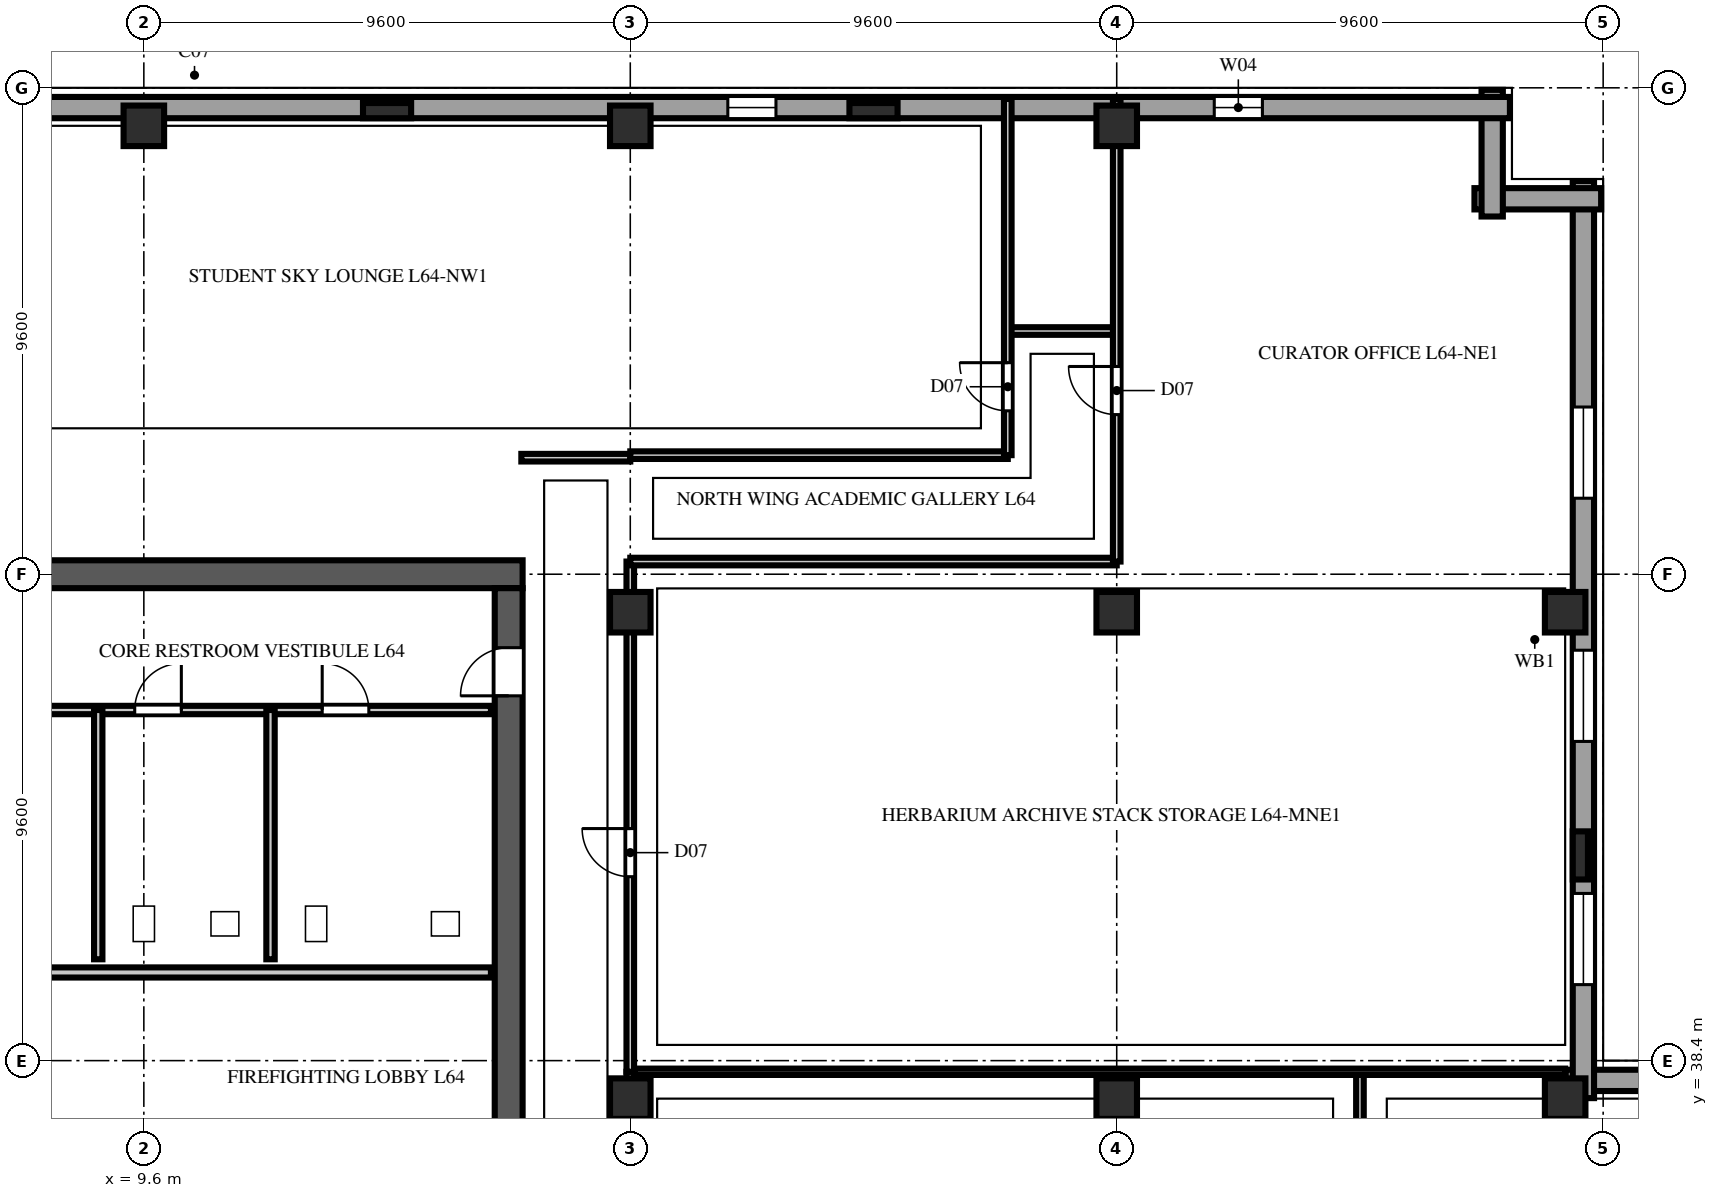
"""IFC4 building model, lengths in metres.
Left out: names, types, materials, properties, quantities, classifications, styles, units other than length and angle.
Written with IfcOpenShell. Run it as: python <this file> out.ifc"""

import sys

from ifc_helpers import new_model, si_unit, direction, frame, frame_2d, origin, origin_2d, place, context, subcontext, project, spatial, rectangle, extrude, element, fill, save


model = new_model("IFC4")
c1 = context("Model", 3, precision=1e-05, world=origin(), true_north=direction((0.0, 1.0)))
c2 = subcontext(c1, "Body", "Model", "MODEL_VIEW")
j1 = project(units=[si_unit("LENGTHUNIT", "METRE"), si_unit("PLANEANGLEUNIT", "RADIAN")], contexts=[c1])
p1 = place(None, origin())
s1 = spatial("IfcSite", under=j1, at=p1, CompositionType="ELEMENT")
p2 = place(p1, origin())
s2 = spatial("IfcBuilding", under=s1, at=p2, CompositionType="ELEMENT")
p3 = place(p2, frame((0.0, 0.0, 252.2)))
s3 = spatial("IfcBuildingStorey", under=s2, at=p3, CompositionType="ELEMENT", Elevation=252.2)
p4 = place(p3, frame((2.475, 48.0, 0.0), z_axis=(0.0, 0.0, 1.0), x_axis=(1.0, 0.0, 0.0)))
e1 = element("IfcWall", 1, at=p4, inside=s3, PredefinedType="SHEAR", context=c2, shape_type="SweptSolid", body=[
    extrude(rectangle(XDim=14.6, YDim=0.55, at=frame_2d((7.3, 0.0))), origin(), (0.0, 0.0, 1.0), 3.48),
])
p5 = place(p3, frame((16.8, 36.4, 0.0), z_axis=(0.0, 0.0, 1.0), x_axis=(0.0, 1.0, 0.0)))
e2 = element("IfcWall", 2, at=p5, inside=s3, PredefinedType="SHEAR", context=c2, shape_type="SweptSolid", body=[
    extrude(rectangle(XDim=11.325, YDim=0.55, at=frame_2d((5.663, 0.0))), origin(), (0.0, 0.0, 1.0), 3.48),
])
p6 = place(p5, frame((9.2, 0.0, 0.0)))
e3 = element("IfcOpeningElement", 3, at=p6, cuts=e2, PredefinedType="OPENING", context=c2, shape_type="SweptSolid", body=[
    extrude(rectangle(XDim=0.95, YDim=2.15, at=frame_2d((0.475, 1.075))), frame((0.0, 0.287, 0.0), z_axis=(0.0, -1.0, 0.0), x_axis=(1.0, 0.0, 0.0)), (0.0, 0.0, 1.0), 0.574),
])
for number, where, z_axis, x_axis in (
    (4, (9.6, 56.85, 0.0), (0.0, 0.0, 1.0), (1.0, 0.0, 0.0)),
    (5, (19.2, 37.65, 0.0), (0.0, 0.0, 1.0), (1.0, 0.0, 0.0)),
    (6, (19.2, 47.25, 0.0), (0.0, 0.0, 1.0), (1.0, 0.0, 0.0)),
    (7, (19.2, 56.85, 0.0), (0.0, 0.0, 1.0), (1.0, 0.0, 0.0)),
    (8, (28.8, 37.65, 0.0), (0.0, 0.0, 1.0), (1.0, 0.0, 0.0)),
    (9, (28.8, 47.25, 0.0), (0.0, 0.0, 1.0), (1.0, 0.0, 0.0)),
    (10, (28.8, 56.85, 0.0), (0.0, 0.0, 1.0), (1.0, 0.0, 0.0)),
    (11, (37.65, 37.65, 0.0), (0.0, 0.0, 1.0), (1.0, 0.0, 0.0)),
    (12, (37.65, 47.25, 0.0), (0.0, 0.0, 1.0), (1.0, 0.0, 0.0)),
):
    element("IfcColumn", number, at=place(p3, frame(where, z_axis=z_axis, x_axis=x_axis)), inside=s3, PredefinedType="COLUMN", context=c2, shape_type="SweptSolid", body=[
        extrude(rectangle(XDim=0.8, YDim=0.8, at=origin_2d()), origin(), (0.0, 0.0, 1.0), 3.8),
    ])
for number, where, z_axis, x_axis in (
    (13, (14.4, 57.15, 0.0), (0.0, 0.0, 1.0), (1.0, 0.0, 0.0)),
    (14, (24.0, 57.15, 0.0), (0.0, 0.0, 1.0), (1.0, 0.0, 0.0)),
    (15, (37.95, 42.45, 0.0), (0.0, 0.0, 1.0), (0.0, 1.0, 0.0)),
):
    element("IfcColumn", number, at=place(p3, frame(where, z_axis=z_axis, x_axis=x_axis)), inside=s3, PredefinedType="PILASTER", context=c2, shape_type="SweptSolid", body=[
        extrude(rectangle(XDim=0.95, YDim=0.3, at=origin_2d()), origin(), (0.0, 0.0, 1.0), 3.8),
    ])
p7 = place(p3, frame((55.76, 38.01, 0.0), z_axis=(0.0, 0.0, 1.0), x_axis=(-1.0, 0.0, 0.0)))
e16 = element("IfcWall", 16, at=p7, inside=s3, PredefinedType="SOLIDWALL", context=c2, shape_type="SweptSolid", body=[
    extrude(rectangle(XDim=18.1, YDim=0.42, at=frame_2d((9.05, 0.0))), origin(), (0.0, 0.0, 1.0), 3.48),
])
p8 = place(p7, frame((4.46, 0.0, 0.85)))
e17 = element("IfcOpeningElement", 17, at=p8, cuts=e16, PredefinedType="OPENING", context=c2, shape_type="SweptSolid", body=[
    extrude(rectangle(XDim=1.8, YDim=1.85, at=frame_2d((0.9, 0.925))), frame((0.0, 0.222, 0.0), z_axis=(0.0, -1.0, 0.0), x_axis=(1.0, 0.0, 0.0)), (0.0, 0.0, 1.0), 0.444),
])
p9 = place(p7, frame((9.26, 0.0, 0.85)))
e18 = element("IfcOpeningElement", 18, at=p9, cuts=e16, PredefinedType="OPENING", context=c2, shape_type="SweptSolid", body=[
    extrude(rectangle(XDim=1.8, YDim=1.85, at=frame_2d((0.9, 0.925))), frame((0.0, 0.222, 0.0), z_axis=(0.0, -1.0, 0.0), x_axis=(1.0, 0.0, 0.0)), (0.0, 0.0, 1.0), 0.444),
])
p10 = place(p7, frame((14.06, 0.0, 0.85)))
e19 = element("IfcOpeningElement", 19, at=p10, cuts=e16, PredefinedType="OPENING", context=c2, shape_type="SweptSolid", body=[
    extrude(rectangle(XDim=1.8, YDim=1.85, at=frame_2d((0.9, 0.925))), frame((0.0, 0.222, 0.0), z_axis=(0.0, -1.0, 0.0), x_axis=(1.0, 0.0, 0.0)), (0.0, 0.0, 1.0), 0.444),
])
p11 = place(p3, frame((38.01, 37.66, 0.0), z_axis=(0.0, 0.0, 1.0), x_axis=(0.0, 1.0, 0.0)))
e20 = element("IfcWall", 20, at=p11, inside=s3, PredefinedType="SOLIDWALL", context=c2, shape_type="SweptSolid", body=[
    extrude(rectangle(XDim=18.1, YDim=0.42, at=frame_2d((9.05, 0.0))), origin(), (0.0, 0.0, 1.0), 3.48),
])
p12 = place(p11, frame((2.24, 0.0, 0.85)))
e21 = element("IfcOpeningElement", 21, at=p12, cuts=e20, PredefinedType="OPENING", context=c2, shape_type="SweptSolid", body=[
    extrude(rectangle(XDim=1.8, YDim=1.85, at=frame_2d((0.9, 0.925))), frame((0.0, 0.222, 0.0), z_axis=(0.0, -1.0, 0.0), x_axis=(1.0, 0.0, 0.0)), (0.0, 0.0, 1.0), 0.444),
])
p13 = place(p11, frame((7.04, 0.0, 0.85)))
e22 = element("IfcOpeningElement", 22, at=p13, cuts=e20, PredefinedType="OPENING", context=c2, shape_type="SweptSolid", body=[
    extrude(rectangle(XDim=1.8, YDim=1.85, at=frame_2d((0.9, 0.925))), frame((0.0, 0.222, 0.0), z_axis=(0.0, -1.0, 0.0), x_axis=(1.0, 0.0, 0.0)), (0.0, 0.0, 1.0), 0.444),
])
p14 = place(p11, frame((11.84, 0.0, 0.85)))
e23 = element("IfcOpeningElement", 23, at=p14, cuts=e20, PredefinedType="OPENING", context=c2, shape_type="SweptSolid", body=[
    extrude(rectangle(XDim=1.8, YDim=1.85, at=frame_2d((0.9, 0.925))), frame((0.0, 0.222, 0.0), z_axis=(0.0, -1.0, 0.0), x_axis=(1.0, 0.0, 0.0)), (0.0, 0.0, 1.0), 0.444),
])
for number, where, z_axis, x_axis in (
    (24, (38.36, 55.41, 0.0), (0.0, 0.0, 1.0), (-1.0, 0.0, 0.0)),
    (25, (36.21, 55.06, 0.0), (0.0, 0.0, 1.0), (0.0, 1.0, 0.0)),
):
    element("IfcWall", number, at=place(p3, frame(where, z_axis=z_axis, x_axis=x_axis)), inside=s3, PredefinedType="SOLIDWALL", context=c2, shape_type="SweptSolid", body=[
        extrude(rectangle(XDim=2.5, YDim=0.42, at=frame_2d((1.25, 0.0))), origin(), (0.0, 0.0, 1.0), 3.48),
    ])
p15 = place(p3, frame((36.56, 57.21, 0.0), z_axis=(0.0, 0.0, 1.0), x_axis=(-1.0, 0.0, 0.0)))
e26 = element("IfcWall", 26, at=p15, inside=s3, PredefinedType="SOLIDWALL", context=c2, shape_type="SweptSolid", body=[
    extrude(rectangle(XDim=34.72, YDim=0.42, at=frame_2d((17.36, 0.0))), origin(), (0.0, 0.0, 1.0), 3.48),
])
p16 = place(p15, frame((4.885, 0.0, 0.85)))
e27 = element("IfcOpeningElement", 27, at=p16, cuts=e26, PredefinedType="OPENING", context=c2, shape_type="SweptSolid", body=[
    extrude(rectangle(XDim=0.95, YDim=1.85, at=frame_2d((0.475, 0.925))), frame((0.0, 0.222, 0.0), z_axis=(0.0, -1.0, 0.0), x_axis=(1.0, 0.0, 0.0)), (0.0, 0.0, 1.0), 0.444),
])
p17 = place(p15, frame((14.485, 0.0, 0.85)))
e28 = element("IfcOpeningElement", 28, at=p17, cuts=e26, PredefinedType="OPENING", context=c2, shape_type="SweptSolid", body=[
    extrude(rectangle(XDim=0.95, YDim=1.85, at=frame_2d((0.475, 0.925))), frame((0.0, 0.222, 0.0), z_axis=(0.0, -1.0, 0.0), x_axis=(1.0, 0.0, 0.0)), (0.0, 0.0, 1.0), 0.444),
])
p18 = place(p3, frame((6.32, 40.14, 0.0), z_axis=(0.0, 0.0, 1.0), x_axis=(1.0, 0.0, 0.0)))
e29 = element("IfcWall", 29, at=p18, inside=s3, PredefinedType="SOLIDWALL", context=c2, shape_type="SweptSolid", body=[
    extrude(rectangle(XDim=10.13, YDim=0.2, at=frame_2d((5.065, 0.0))), origin(), (0.0, 0.0, 1.0), 3.48),
])
p19 = place(p3, frame((6.32, 45.32, 0.0), z_axis=(0.0, 0.0, 1.0), x_axis=(1.0, 0.0, 0.0)))
e30 = element("IfcWall", 30, at=p19, inside=s3, PredefinedType="PLUMBINGWALL", context=c2, shape_type="SweptSolid", body=[
    extrude(rectangle(XDim=10.13, YDim=0.165, at=frame_2d((5.065, 0.0))), origin(), (0.0, 0.0, 1.0), 3.48),
])
p20 = place(p19, frame((0.55, 0.0, 0.0)))
e31 = element("IfcOpeningElement", 31, at=p20, cuts=e30, PredefinedType="OPENING", context=c2, shape_type="SweptSolid", body=[
    extrude(rectangle(XDim=0.85, YDim=2.1, at=frame_2d((0.425, 1.05))), frame((0.0, 0.094, 0.0), z_axis=(0.0, -1.0, 0.0), x_axis=(1.0, 0.0, 0.0)), (0.0, 0.0, 1.0), 0.189),
])
p21 = place(p19, frame((3.1, 0.0, 0.0)))
e32 = element("IfcOpeningElement", 32, at=p21, cuts=e30, PredefinedType="OPENING", context=c2, shape_type="SweptSolid", body=[
    extrude(rectangle(XDim=0.92, YDim=2.15, at=frame_2d((0.46, 1.075))), frame((0.0, 0.094, 0.0), z_axis=(0.0, -1.0, 0.0), x_axis=(1.0, 0.0, 0.0)), (0.0, 0.0, 1.0), 0.189),
])
p22 = place(p19, frame((6.8, 0.0, 0.0)))
e33 = element("IfcOpeningElement", 33, at=p22, cuts=e30, PredefinedType="OPENING", context=c2, shape_type="SweptSolid", body=[
    extrude(rectangle(XDim=0.92, YDim=2.15, at=frame_2d((0.46, 1.075))), frame((0.0, 0.094, 0.0), z_axis=(0.0, -1.0, 0.0), x_axis=(1.0, 0.0, 0.0)), (0.0, 0.0, 1.0), 0.189),
])
for number, where, z_axis, x_axis in (
    (34, (8.7, 40.4, 0.0), (0.0, 0.0, 1.0), (0.0, 1.0, 0.0)),
    (35, (12.1, 40.4, 0.0), (0.0, 0.0, 1.0), (0.0, 1.0, 0.0)),
):
    element("IfcWall", number, at=place(p3, frame(where, z_axis=z_axis, x_axis=x_axis)), inside=s3, PredefinedType="PLUMBINGWALL", context=c2, shape_type="SweptSolid", body=[
        extrude(rectangle(XDim=4.92, YDim=0.165, at=frame_2d((2.46, 0.0))), origin(), (0.0, 0.0, 1.0), 3.48),
    ])
p23 = place(p3, frame((17.05, 50.3, 0.0), z_axis=(0.0, 0.0, 1.0), x_axis=(1.0, 0.0, 0.0)))
e36 = element("IfcWall", 36, at=p23, inside=s3, PredefinedType="PARTITIONING", context=c2, shape_type="SweptSolid", body=[
    extrude(rectangle(XDim=2.15, YDim=0.15, at=frame_2d((1.075, 0.0))), origin(), (0.0, 0.0, 1.0), 3.48),
])
p24 = place(p3, frame((33.6, 30.55, 0.0), z_axis=(0.0, 0.0, 1.0), x_axis=(0.0, 1.0, 0.0)))
e37 = element("IfcWall", 37, at=p24, inside=s3, PredefinedType="PARTITIONING", context=c2, shape_type="SweptSolid", body=[
    extrude(rectangle(XDim=7.63, YDim=0.15, at=frame_2d((3.815, 0.0))), origin(), (0.0, 0.0, 1.0), 3.48),
])
p25 = place(p3, frame((19.2, 30.55, 0.0), z_axis=(0.0, 0.0, 1.0), x_axis=(0.0, 1.0, 0.0)))
e38 = element("IfcWall", 38, at=p25, inside=s3, PredefinedType="PARTITIONING", context=c2, shape_type="SweptSolid", body=[
    extrude(rectangle(XDim=7.63, YDim=0.15, at=frame_2d((3.815, 0.0))), origin(), (0.0, 0.0, 1.0), 2.863),
])
p26 = place(p3, frame((19.28, 38.18, 0.0), z_axis=(0.0, 0.0, 1.0), x_axis=(1.0, 0.0, 0.0)))
e39 = element("IfcWall", 39, at=p26, inside=s3, PredefinedType="PARTITIONING", context=c2, shape_type="SweptSolid", body=[
    extrude(rectangle(XDim=18.37, YDim=0.125, at=frame_2d((9.185, 0.0))), origin(), (0.0, 0.0, 1.0), 3.48),
])
p27 = place(p3, frame((19.2, 38.18, 0.0), z_axis=(0.0, 0.0, 1.0), x_axis=(0.0, 1.0, 0.0)))
e40 = element("IfcWall", 40, at=p27, inside=s3, PredefinedType="PARTITIONING", context=c2, shape_type="SweptSolid", body=[
    extrude(rectangle(XDim=10.07, YDim=0.15, at=frame_2d((5.035, 0.0))), origin(), (0.0, 0.0, 1.0), 2.863),
])
p28 = place(p27, frame((3.85, 0.0, 0.0)))
e41 = element("IfcOpeningElement", 41, at=p28, cuts=e40, PredefinedType="OPENING", context=c2, shape_type="SweptSolid", body=[
    extrude(rectangle(XDim=0.95, YDim=2.15, at=frame_2d((0.475, 1.075))), frame((0.0, 0.087, 0.0), z_axis=(0.0, -1.0, 0.0), x_axis=(1.0, 0.0, 0.0)), (0.0, 0.0, 1.0), 0.174),
])
p29 = place(p3, frame((19.2, 48.25, 0.0), z_axis=(0.0, 0.0, 1.0), x_axis=(1.0, 0.0, 0.0)))
e42 = element("IfcWall", 42, at=p29, inside=s3, PredefinedType="PARTITIONING", context=c2, shape_type="SweptSolid", body=[
    extrude(rectangle(XDim=9.6, YDim=0.15, at=frame_2d((4.8, 0.0))), origin(), (0.0, 0.0, 1.0), 3.48),
])
p30 = place(p3, frame((19.2, 50.35, 0.0), z_axis=(0.0, 0.0, 1.0), x_axis=(1.0, 0.0, 0.0)))
e43 = element("IfcWall", 43, at=p30, inside=s3, PredefinedType="PARTITIONING", context=c2, shape_type="SweptSolid", body=[
    extrude(rectangle(XDim=7.45, YDim=0.15, at=frame_2d((3.725, 0.0))), origin(), (0.0, 0.0, 1.0), 3.48),
])
p31 = place(p3, frame((26.65, 52.8, 0.0), z_axis=(0.0, 0.0, 1.0), x_axis=(1.0, 0.0, 0.0)))
e44 = element("IfcWall", 44, at=p31, inside=s3, PredefinedType="PARTITIONING", context=c2, shape_type="SweptSolid", body=[
    extrude(rectangle(XDim=2.15, YDim=0.15, at=frame_2d((1.075, 0.0))), origin(), (0.0, 0.0, 1.0), 3.48),
])
p32 = place(p3, frame((28.8, 48.25, 0.0), z_axis=(0.0, 0.0, 1.0), x_axis=(0.0, 1.0, 0.0)))
e45 = element("IfcWall", 45, at=p32, inside=s3, PredefinedType="PARTITIONING", context=c2, shape_type="SweptSolid", body=[
    extrude(rectangle(XDim=8.6, YDim=0.15, at=frame_2d((4.3, 0.0))), origin(), (0.0, 0.0, 1.0), 2.863),
])
p33 = place(p32, frame((2.9, 0.0, 0.0)))
e46 = element("IfcOpeningElement", 46, at=p33, cuts=e45, PredefinedType="OPENING", context=c2, shape_type="SweptSolid", body=[
    extrude(rectangle(XDim=0.95, YDim=2.15, at=frame_2d((0.475, 1.075))), frame((0.0, 0.087, 0.0), z_axis=(0.0, -1.0, 0.0), x_axis=(1.0, 0.0, 0.0)), (0.0, 0.0, 1.0), 0.174),
])
p34 = place(p3, frame((28.8, 56.85, 0.0), z_axis=(0.0, 0.0, 1.0), x_axis=(0.0, 1.0, 0.0)))
e47 = element("IfcWall", 47, at=p34, inside=s3, PredefinedType="PARTITIONING", context=c2, shape_type="SweptSolid", body=[
    extrude(rectangle(XDim=0.53, YDim=0.15, at=frame_2d((0.265, 0.0))), origin(), (0.0, 0.0, 1.0), 3.48),
])
p35 = place(p3, frame((26.65, 50.35, 0.0), z_axis=(0.0, 0.0, 1.0), x_axis=(0.0, 1.0, 0.0)))
e48 = element("IfcWall", 48, at=p35, inside=s3, PredefinedType="PARTITIONING", context=c2, shape_type="SweptSolid", body=[
    extrude(rectangle(XDim=7.03, YDim=0.15, at=frame_2d((3.515, 0.0))), origin(), (0.0, 0.0, 1.0), 3.48),
])
p36 = place(p35, frame((0.875, 0.0, 0.0)))
e49 = element("IfcOpeningElement", 49, at=p36, cuts=e48, PredefinedType="OPENING", context=c2, shape_type="SweptSolid", body=[
    extrude(rectangle(XDim=0.95, YDim=2.15, at=frame_2d((0.475, 1.075))), frame((0.0, 0.087, 0.0), z_axis=(0.0, -1.0, 0.0), x_axis=(1.0, 0.0, 0.0)), (0.0, 0.0, 1.0), 0.174),
])
p37 = place(p12, origin())
e50 = element("IfcWindow", 50, at=p37, inside=s3, PartitioningType="DOUBLE_PANEL_VERTICAL", PredefinedType="WINDOW", context=c2, shape_type="SweptSolid", body=[
    extrude(rectangle(XDim=1.8, YDim=1.85, at=frame_2d((0.9, 0.925))), frame((0.0, 0.11, 0.0), z_axis=(0.0, -1.0, 0.0), x_axis=(1.0, 0.0, 0.0)), (0.0, 0.0, 1.0), 0.06),
])
fill(e21, e50)
p38 = place(p13, origin())
e51 = element("IfcWindow", 51, at=p38, inside=s3, PartitioningType="DOUBLE_PANEL_VERTICAL", PredefinedType="WINDOW", context=c2, shape_type="SweptSolid", body=[
    extrude(rectangle(XDim=1.8, YDim=1.85, at=frame_2d((0.9, 0.925))), frame((0.0, 0.11, 0.0), z_axis=(0.0, -1.0, 0.0), x_axis=(1.0, 0.0, 0.0)), (0.0, 0.0, 1.0), 0.06),
])
fill(e22, e51)
p39 = place(p14, origin())
e52 = element("IfcWindow", 52, at=p39, inside=s3, PartitioningType="DOUBLE_PANEL_VERTICAL", PredefinedType="WINDOW", context=c2, shape_type="SweptSolid", body=[
    extrude(rectangle(XDim=1.8, YDim=1.85, at=frame_2d((0.9, 0.925))), frame((0.0, 0.11, 0.0), z_axis=(0.0, -1.0, 0.0), x_axis=(1.0, 0.0, 0.0)), (0.0, 0.0, 1.0), 0.06),
])
fill(e23, e52)
p40 = place(p16, origin())
e53 = element("IfcWindow", 53, at=p40, inside=s3, PartitioningType="SINGLE_PANEL", PredefinedType="WINDOW", context=c2, shape_type="SweptSolid", body=[
    extrude(rectangle(XDim=0.95, YDim=1.85, at=frame_2d((0.475, 0.925))), frame((0.0, 0.11, 0.0), z_axis=(0.0, -1.0, 0.0), x_axis=(1.0, 0.0, 0.0)), (0.0, 0.0, 1.0), 0.06),
])
fill(e27, e53)
p41 = place(p17, origin())
e54 = element("IfcWindow", 54, at=p41, inside=s3, PartitioningType="SINGLE_PANEL", PredefinedType="WINDOW", context=c2, shape_type="SweptSolid", body=[
    extrude(rectangle(XDim=0.95, YDim=1.85, at=frame_2d((0.475, 0.925))), frame((0.0, 0.11, 0.0), z_axis=(0.0, -1.0, 0.0), x_axis=(1.0, 0.0, 0.0)), (0.0, 0.0, 1.0), 0.06),
])
fill(e28, e54)
p42 = place(p6, origin())
e55 = element("IfcDoor", 55, at=p42, inside=s3, OperationType="SINGLE_SWING_LEFT", PredefinedType="DOOR", context=c2, shape_type="SweptSolid", body=[
    extrude(rectangle(XDim=0.95, YDim=2.15, at=frame_2d((0.475, 1.075))), frame((0.0, 0.025, 0.0), z_axis=(0.0, -1.0, 0.0), x_axis=(1.0, 0.0, 0.0)), (0.0, 0.0, 1.0), 0.05),
])
fill(e3, e55)
p43 = place(p21, origin())
e56 = element("IfcDoor", 56, at=p43, inside=s3, OperationType="SINGLE_SWING_RIGHT", PredefinedType="DOOR", context=c2, shape_type="SweptSolid", body=[
    extrude(rectangle(XDim=0.92, YDim=2.15, at=frame_2d((0.46, 1.075))), frame((0.0, 0.025, 0.0), z_axis=(0.0, -1.0, 0.0), x_axis=(1.0, 0.0, 0.0)), (0.0, 0.0, 1.0), 0.05),
])
fill(e32, e56)
p44 = place(p22, origin())
e57 = element("IfcDoor", 57, at=p44, inside=s3, OperationType="SINGLE_SWING_LEFT", PredefinedType="DOOR", context=c2, shape_type="SweptSolid", body=[
    extrude(rectangle(XDim=0.92, YDim=2.15, at=frame_2d((0.46, 1.075))), frame((0.0, 0.025, 0.0), z_axis=(0.0, -1.0, 0.0), x_axis=(1.0, 0.0, 0.0)), (0.0, 0.0, 1.0), 0.05),
])
fill(e33, e57)
p45 = place(p28, origin())
e58 = element("IfcDoor", 58, at=p45, inside=s3, OperationType="SINGLE_SWING_RIGHT", PredefinedType="DOOR", context=c2, shape_type="SweptSolid", body=[
    extrude(rectangle(XDim=0.95, YDim=2.15, at=frame_2d((0.475, 1.075))), frame((0.0, 0.025, 0.0), z_axis=(0.0, -1.0, 0.0), x_axis=(1.0, 0.0, 0.0)), (0.0, 0.0, 1.0), 0.05),
])
fill(e41, e58)
p46 = place(p33, origin())
e59 = element("IfcDoor", 59, at=p46, inside=s3, OperationType="SINGLE_SWING_RIGHT", PredefinedType="DOOR", context=c2, shape_type="SweptSolid", body=[
    extrude(rectangle(XDim=0.95, YDim=2.15, at=frame_2d((0.475, 1.075))), frame((0.0, 0.025, 0.0), z_axis=(0.0, -1.0, 0.0), x_axis=(1.0, 0.0, 0.0)), (0.0, 0.0, 1.0), 0.05),
])
fill(e46, e59)
p47 = place(p36, origin())
e60 = element("IfcDoor", 60, at=p47, inside=s3, OperationType="SINGLE_SWING_RIGHT", PredefinedType="DOOR", context=c2, shape_type="SweptSolid", body=[
    extrude(rectangle(XDim=0.95, YDim=2.15, at=frame_2d((0.475, 1.075))), frame((0.0, 0.025, 0.0), z_axis=(0.0, -1.0, 0.0), x_axis=(1.0, 0.0, 0.0)), (0.0, 0.0, 1.0), 0.05),
])
fill(e49, e60)
save(model, sys.argv[1])
